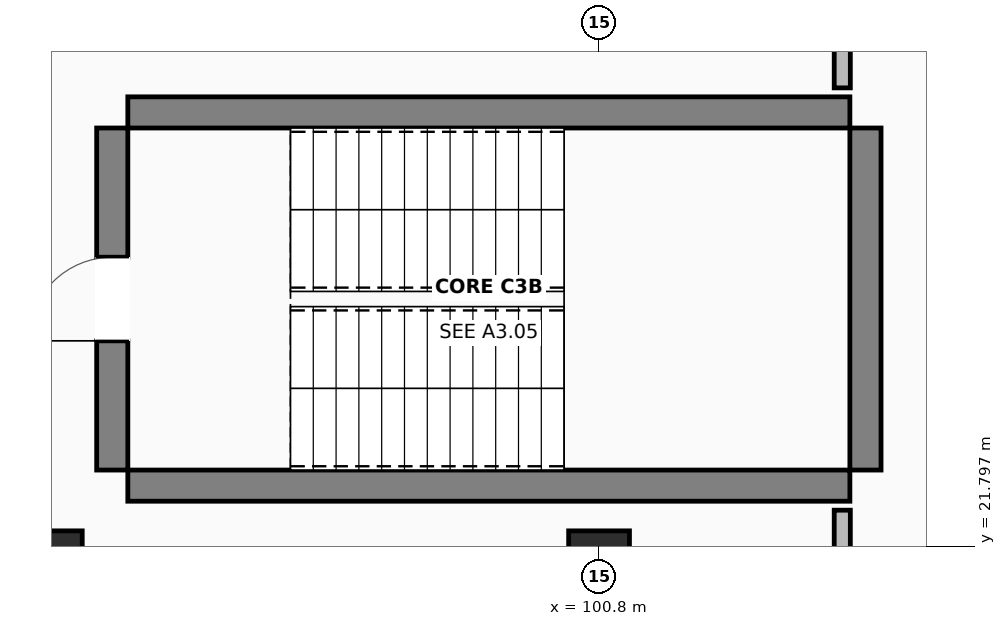
"""IFC4 building model, lengths in metres.
Left out: names, types, materials, properties, quantities, classifications, styles, units other than length and angle.
Written with IfcOpenShell. Run it as: python <this file> out.ifc"""

import sys

from ifc_helpers import new_model, si_unit, direction, frame, frame_2d, origin, origin_2d, place, context, subcontext, project, spatial, rectangle, extrude, element, fill, save


model = new_model("IFC4")
c1 = context("Model", 3, precision=1e-05, world=origin(), true_north=direction((0.0, 1.0)))
c2 = subcontext(c1, "Body", "Model", "MODEL_VIEW")
j1 = project(units=[si_unit("LENGTHUNIT", "METRE"), si_unit("PLANEANGLEUNIT", "RADIAN")], contexts=[c1])
p1 = place(None, origin())
s1 = spatial("IfcSite", under=j1, at=p1, CompositionType="ELEMENT")
p2 = place(p1, origin())
s2 = spatial("IfcBuilding", under=s1, at=p2, CompositionType="ELEMENT")
p3 = place(p2, frame((0.0, 0.0, 13.5)))
s3 = spatial("IfcBuildingStorey", under=s2, at=p3, CompositionType="ELEMENT", Elevation=13.5)
for number, where, z_axis, x_axis in (
    (1, (93.6, 21.6, 0.0), (0.0, 0.0, 1.0), (1.0, 0.0, 0.0)),
    (2, (100.8, 21.6, 0.0), (0.0, 0.0, 1.0), (1.0, 0.0, 0.0)),
):
    element("IfcColumn", number, at=place(p3, frame(where, z_axis=z_axis, x_axis=x_axis)), inside=s3, PredefinedType="COLUMN", context=c2, shape_type="SweptSolid", body=[
        extrude(rectangle(XDim=0.8, YDim=0.8, at=origin_2d()), origin(), (0.0, 0.0, 1.0), 4.22),
    ])
for number, where, z_axis, x_axis in (
    (3, (94.6, 22.595, 0.0), (0.0, 0.0, 1.0), (1.0, 0.0, 0.0)),
    (4, (94.6, 27.505, 0.0), (0.0, 0.0, 1.0), (1.0, 0.0, 0.0)),
):
    element("IfcWall", number, at=place(p3, frame(where, z_axis=z_axis, x_axis=x_axis)), inside=s3, PredefinedType="SHEAR", context=c2, shape_type="SweptSolid", body=[
        extrude(rectangle(XDim=9.5, YDim=0.41, at=frame_2d((4.75, 0.0))), origin(), (0.0, 0.0, 1.0), 4.22),
    ])
p4 = place(p3, frame((94.395, 22.8, 0.0), z_axis=(0.0, 0.0, 1.0), x_axis=(0.0, 1.0, 0.0)))
e5 = element("IfcWall", 5, at=p4, inside=s3, PredefinedType="SHEAR", context=c2, shape_type="SweptSolid", body=[
    extrude(rectangle(XDim=4.5, YDim=0.41, at=frame_2d((2.25, 0.0))), origin(), (0.0, 0.0, 1.0), 4.22),
])
p5 = place(p4, frame((1.7, 0.0, 0.0)))
e6 = element("IfcOpeningElement", 6, at=p5, cuts=e5, PredefinedType="OPENING", context=c2, shape_type="SweptSolid", body=[
    extrude(rectangle(XDim=1.1, YDim=2.15, at=frame_2d((0.55, 1.075))), frame((0.0, 0.215, 0.0), z_axis=(0.0, -1.0, 0.0), x_axis=(1.0, 0.0, 0.0)), (0.0, 0.0, 1.0), 0.43),
])
p6 = place(p3, frame((104.305, 22.8, 0.0), z_axis=(0.0, 0.0, 1.0), x_axis=(0.0, 1.0, 0.0)))
e7 = element("IfcWall", 7, at=p6, inside=s3, PredefinedType="SHEAR", context=c2, shape_type="SweptSolid", body=[
    extrude(rectangle(XDim=4.5, YDim=0.41, at=frame_2d((2.25, 0.0))), origin(), (0.0, 0.0, 1.0), 4.22),
])
p7 = place(p3, frame((104.0, 18.802, 0.0), z_axis=(0.0, 0.0, 1.0), x_axis=(0.0, 1.0, 0.0)))
e8 = element("IfcWall", 8, at=p7, inside=s3, PredefinedType="PARTITIONING", context=c2, shape_type="SweptSolid", body=[
    extrude(rectangle(XDim=3.47, YDim=0.212, at=frame_2d((1.735, 0.0))), origin(), (0.0, 0.0, 1.0), 3.26),
])
p8 = place(p3, frame((104.0, 27.828, 0.0), z_axis=(0.0, 0.0, 1.0), x_axis=(0.0, 1.0, 0.0)))
e9 = element("IfcWall", 9, at=p8, inside=s3, PredefinedType="PARTITIONING", context=c2, shape_type="SweptSolid", body=[
    extrude(rectangle(XDim=2.352, YDim=0.212, at=frame_2d((1.176, 0.0))), origin(), (0.0, 0.0, 1.0), 3.26),
])
p9 = place(p5, origin())
e10 = element("IfcDoor", 10, at=p9, inside=s3, OperationType="SINGLE_SWING_LEFT", PredefinedType="DOOR", context=c2, shape_type="SweptSolid", body=[
    extrude(rectangle(XDim=1.1, YDim=2.15, at=frame_2d((0.55, 1.075))), frame((0.0, 0.025, 0.0), z_axis=(0.0, -1.0, 0.0), x_axis=(1.0, 0.0, 0.0)), (0.0, 0.0, 1.0), 0.05),
])
fill(e6, e10)
save(model, sys.argv[1])
